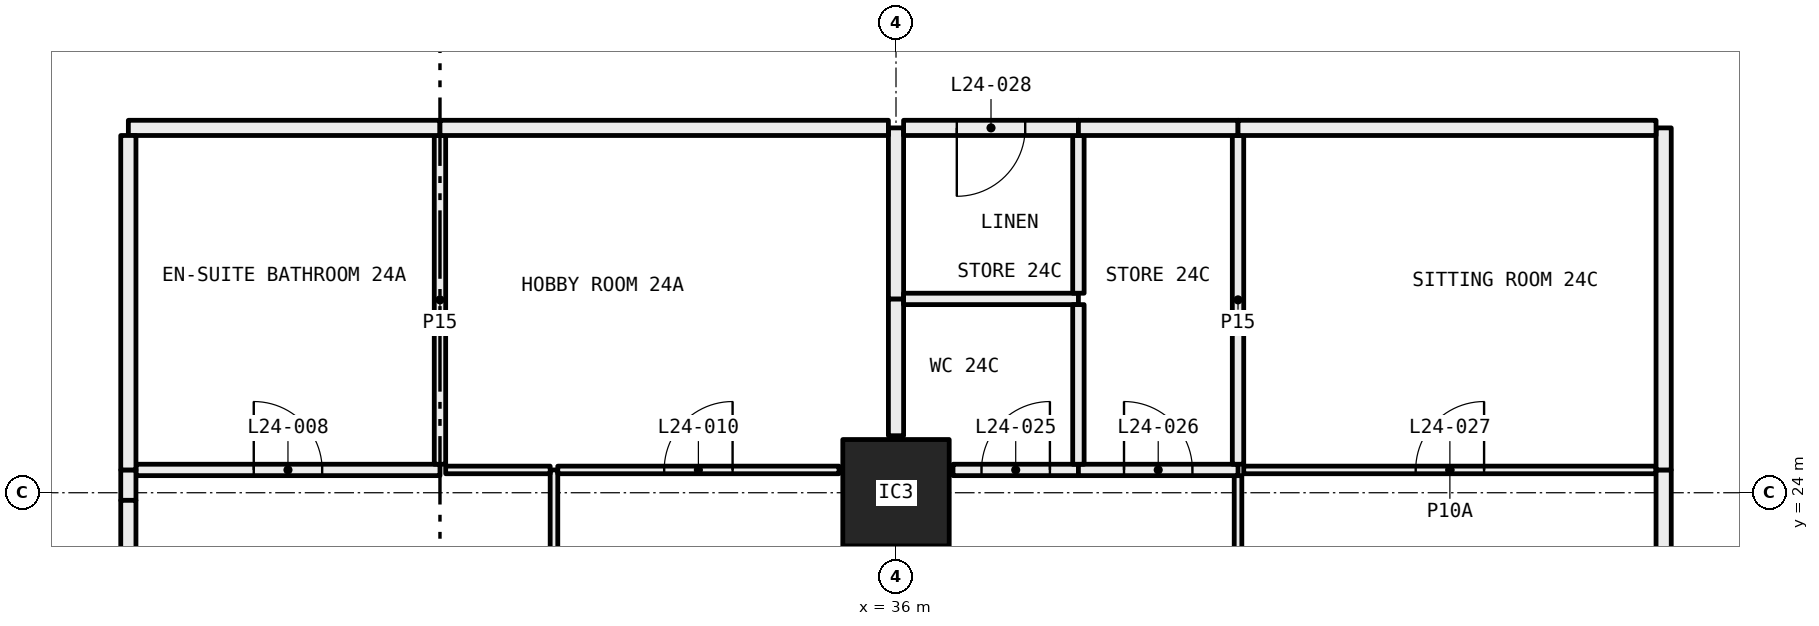
"""IFC4 building model, lengths in metres.
Left out: names, types, materials, properties, quantities, classifications, styles, units other than length and angle.
Written with IfcOpenShell. Run it as: python <this file> out.ifc"""

import sys

from ifc_helpers import new_model, si_unit, direction, frame, frame_2d, origin, origin_2d, place, context, subcontext, project, spatial, rectangle, hollow_rectangle, extrude, element, fill, save


model = new_model("IFC4")
c1 = context("Model", 3, precision=1e-05, world=origin(), true_north=direction((0.0, 1.0)))
c2 = subcontext(c1, "Body", "Model", "MODEL_VIEW")
j1 = project(units=[si_unit("LENGTHUNIT", "METRE"), si_unit("PLANEANGLEUNIT", "RADIAN")], contexts=[c1])
p1 = place(None, origin())
s1 = spatial("IfcSite", under=j1, at=p1, CompositionType="ELEMENT")
p2 = place(p1, origin())
s2 = spatial("IfcBuilding", under=s1, at=p2, CompositionType="ELEMENT")
p3 = place(p2, frame((0.0, 0.0, 96.6)))
s3 = spatial("IfcBuildingStorey", under=s2, at=p3, CompositionType="ELEMENT", Elevation=96.6)
p4 = place(p3, frame((36.0, 24.0, 0.0), z_axis=(0.0, 0.0, 1.0), x_axis=(1.0, 0.0, 0.0)))
e1 = element("IfcColumn", 1, at=p4, inside=s3, PredefinedType="COLUMN", context=c2, shape_type="SweptSolid", body=[
    extrude(hollow_rectangle(XDim=1.4, YDim=1.4, WallThickness=0.06, at=origin_2d()), origin(), (0.0, 0.0, 1.0), 3.05),
])
p5 = place(p3, frame((31.5, 18.075, 0.0), z_axis=(0.0, 0.0, 1.0), x_axis=(0.0, 1.0, 0.0)))
e2 = element("IfcWall", 2, at=p5, inside=s3, PredefinedType="PARTITIONING", context=c2, shape_type="SweptSolid", body=[
    extrude(rectangle(XDim=6.225, YDim=0.1, at=frame_2d((3.113, 0.0))), origin(), (0.0, 0.0, 1.0), 2.45),
])
p6 = place(p5, frame((2.663, 0.0, 0.0)))
e3 = element("IfcOpeningElement", 3, at=p6, cuts=e2, PredefinedType="OPENING", context=c2, shape_type="SweptSolid", body=[
    extrude(rectangle(XDim=0.9, YDim=2.1, at=frame_2d((0.45, 1.05))), frame((0.0, 0.06, 0.0), z_axis=(0.0, -1.0, 0.0), x_axis=(1.0, 0.0, 0.0)), (0.0, 0.0, 1.0), 0.12),
])
p7 = place(p3, frame((30.0, 24.3, 0.0), z_axis=(0.0, 0.0, 1.0), x_axis=(-1.0, 0.0, 0.0)))
e4 = element("IfcWall", 4, at=p7, inside=s3, PredefinedType="PARTITIONING", context=c2, shape_type="SweptSolid", body=[
    extrude(rectangle(XDim=4.0, YDim=0.15, at=frame_2d((2.0, 0.0))), origin(), (0.0, 0.0, 1.0), 3.05),
])
p8 = place(p7, frame((1.55, 0.0, 0.0)))
e5 = element("IfcOpeningElement", 5, at=p8, cuts=e4, PredefinedType="OPENING", context=c2, shape_type="SweptSolid", body=[
    extrude(rectangle(XDim=0.9, YDim=2.1, at=frame_2d((0.45, 1.05))), frame((0.0, 0.085, 0.0), z_axis=(0.0, -1.0, 0.0), x_axis=(1.0, 0.0, 0.0)), (0.0, 0.0, 1.0), 0.17),
])
p9 = place(p3, frame((31.45, 24.3, 0.0), z_axis=(0.0, 0.0, 1.0), x_axis=(-1.0, 0.0, 0.0)))
e6 = element("IfcWall", 6, at=p9, inside=s3, PredefinedType="PARTITIONING", context=c2, shape_type="SweptSolid", body=[
    extrude(rectangle(XDim=1.375, YDim=0.1, at=frame_2d((0.688, 0.0))), origin(), (0.0, 0.0, 1.0), 3.05),
])
p10 = place(p3, frame((25.9, 24.3, 0.0), z_axis=(0.0, 0.0, 1.0), x_axis=(0.0, -1.0, 0.0)))
e7 = element("IfcWall", 7, at=p10, inside=s3, PredefinedType="PARTITIONING", context=c2, shape_type="SweptSolid", body=[
    extrude(rectangle(XDim=0.4, YDim=0.2, at=frame_2d((0.2, 0.0))), origin(), (0.0, 0.0, 1.0), 2.45),
])
p11 = place(p3, frame((25.9, 23.9, 0.0), z_axis=(0.0, 0.0, 1.0), x_axis=(0.0, -1.0, 0.0)))
e8 = element("IfcWall", 8, at=p11, inside=s3, PredefinedType="PARTITIONING", context=c2, shape_type="SweptSolid", body=[
    extrude(rectangle(XDim=5.8, YDim=0.2, at=frame_2d((2.9, 0.0))), origin(), (0.0, 0.0, 1.0), 3.05),
])
p12 = place(p3, frame((35.25, 24.3, 0.0), z_axis=(0.0, 0.0, 1.0), x_axis=(-1.0, 0.0, 0.0)))
e9 = element("IfcWall", 9, at=p12, inside=s3, PredefinedType="PARTITIONING", context=c2, shape_type="SweptSolid", body=[
    extrude(rectangle(XDim=3.7, YDim=0.1, at=frame_2d((1.85, 0.0))), origin(), (0.0, 0.0, 1.0), 3.05),
])
p13 = place(p12, frame((1.4, 0.0, 0.0)))
e10 = element("IfcOpeningElement", 10, at=p13, cuts=e9, PredefinedType="OPENING", context=c2, shape_type="SweptSolid", body=[
    extrude(rectangle(XDim=0.9, YDim=2.1, at=frame_2d((0.45, 1.05))), frame((0.0, 0.06, 0.0), z_axis=(0.0, -1.0, 0.0), x_axis=(1.0, 0.0, 0.0)), (0.0, 0.0, 1.0), 0.12),
])
p14 = place(p3, frame((30.0, 24.375, 0.0), z_axis=(0.0, 0.0, 1.0), x_axis=(0.0, 1.0, 0.0)))
e11 = element("IfcWall", 11, at=p14, inside=s3, PredefinedType="PARTITIONING", context=c2, shape_type="SweptSolid", body=[
    extrude(rectangle(XDim=4.325, YDim=0.15, at=frame_2d((2.163, 0.0))), origin(), (0.0, 0.0, 1.0), 3.05),
])
p15 = place(p3, frame((30.0, 28.8, 0.0), z_axis=(0.0, 0.0, 1.0), x_axis=(-1.0, 0.0, 0.0)))
e12 = element("IfcWall", 12, at=p15, inside=s3, PredefinedType="PARTITIONING", context=c2, shape_type="SweptSolid", body=[
    extrude(rectangle(XDim=4.1, YDim=0.2, at=frame_2d((2.05, 0.0))), origin(), (0.0, 0.0, 1.0), 3.05),
])
p16 = place(p3, frame((25.9, 28.7, 0.0), z_axis=(0.0, 0.0, 1.0), x_axis=(0.0, -1.0, 0.0)))
e13 = element("IfcWall", 13, at=p16, inside=s3, PredefinedType="PARTITIONING", context=c2, shape_type="SweptSolid", body=[
    extrude(rectangle(XDim=4.4, YDim=0.2, at=frame_2d((2.2, 0.0))), origin(), (0.0, 0.0, 1.0), 3.05),
])
p17 = place(p3, frame((36.0, 24.75, 0.0), z_axis=(0.0, 0.0, 1.0), x_axis=(0.0, 1.0, 0.0)))
e14 = element("IfcWall", 14, at=p17, inside=s3, PredefinedType="PARTITIONING", context=c2, shape_type="SweptSolid", body=[
    extrude(rectangle(XDim=1.8, YDim=0.2, at=frame_2d((0.9, 0.0))), origin(), (0.0, 0.0, 1.0), 2.45),
])
p18 = place(p3, frame((36.0, 26.55, 0.0), z_axis=(0.0, 0.0, 1.0), x_axis=(0.0, 1.0, 0.0)))
e15 = element("IfcWall", 15, at=p18, inside=s3, PredefinedType="PARTITIONING", context=c2, shape_type="SweptSolid", body=[
    extrude(rectangle(XDim=2.25, YDim=0.2, at=frame_2d((1.125, 0.0))), origin(), (0.0, 0.0, 1.0), 2.45),
])
p19 = place(p3, frame((35.9, 28.8, 0.0), z_axis=(0.0, 0.0, 1.0), x_axis=(-1.0, 0.0, 0.0)))
e16 = element("IfcWall", 16, at=p19, inside=s3, PredefinedType="PARTITIONING", context=c2, shape_type="SweptSolid", body=[
    extrude(rectangle(XDim=5.9, YDim=0.2, at=frame_2d((2.95, 0.0))), origin(), (0.0, 0.0, 1.0), 3.05),
])
p20 = place(p3, frame((40.5, 18.075, 0.0), z_axis=(0.0, 0.0, 1.0), x_axis=(0.0, 1.0, 0.0)))
e17 = element("IfcWall", 17, at=p20, inside=s3, PredefinedType="PARTITIONING", context=c2, shape_type="SweptSolid", body=[
    extrude(rectangle(XDim=6.15, YDim=0.1, at=frame_2d((3.075, 0.0))), origin(), (0.0, 0.0, 1.0), 2.45),
])
p21 = place(p20, frame((2.625, 0.0, 0.0)))
e18 = element("IfcOpeningElement", 18, at=p21, cuts=e17, PredefinedType="OPENING", context=c2, shape_type="SweptSolid", body=[
    extrude(rectangle(XDim=0.9, YDim=2.1, at=frame_2d((0.45, 1.05))), frame((0.0, 0.06, 0.0), z_axis=(0.0, -1.0, 0.0), x_axis=(1.0, 0.0, 0.0)), (0.0, 0.0, 1.0), 0.12),
])
p22 = place(p3, frame((38.4, 24.3, 0.0), z_axis=(0.0, 0.0, 1.0), x_axis=(-1.0, 0.0, 0.0)))
e19 = element("IfcWall", 19, at=p22, inside=s3, PredefinedType="PARTITIONING", context=c2, shape_type="SweptSolid", body=[
    extrude(rectangle(XDim=1.65, YDim=0.15, at=frame_2d((0.825, 0.0))), origin(), (0.0, 0.0, 1.0), 3.05),
])
p23 = place(p22, frame((0.375, 0.0, 0.0)))
e20 = element("IfcOpeningElement", 20, at=p23, cuts=e19, PredefinedType="OPENING", context=c2, shape_type="SweptSolid", body=[
    extrude(rectangle(XDim=0.9, YDim=2.1, at=frame_2d((0.45, 1.05))), frame((0.0, 0.085, 0.0), z_axis=(0.0, -1.0, 0.0), x_axis=(1.0, 0.0, 0.0)), (0.0, 0.0, 1.0), 0.17),
])
p24 = place(p3, frame((40.5, 24.3, 0.0), z_axis=(0.0, 0.0, 1.0), x_axis=(-1.0, 0.0, 0.0)))
e21 = element("IfcWall", 21, at=p24, inside=s3, PredefinedType="PARTITIONING", context=c2, shape_type="SweptSolid", body=[
    extrude(rectangle(XDim=2.1, YDim=0.15, at=frame_2d((1.05, 0.0))), origin(), (0.0, 0.0, 1.0), 3.05),
])
p25 = place(p24, frame((0.6, 0.0, 0.0)))
e22 = element("IfcOpeningElement", 22, at=p25, cuts=e21, PredefinedType="OPENING", context=c2, shape_type="SweptSolid", body=[
    extrude(rectangle(XDim=0.9, YDim=2.1, at=frame_2d((0.45, 1.05))), frame((0.0, 0.085, 0.0), z_axis=(0.0, -1.0, 0.0), x_axis=(1.0, 0.0, 0.0)), (0.0, 0.0, 1.0), 0.17),
])
p26 = place(p3, frame((46.0, 24.3, 0.0), z_axis=(0.0, 0.0, 1.0), x_axis=(-1.0, 0.0, 0.0)))
e23 = element("IfcWall", 23, at=p26, inside=s3, PredefinedType="PARTITIONING", context=c2, shape_type="SweptSolid", body=[
    extrude(rectangle(XDim=5.425, YDim=0.1, at=frame_2d((2.712, 0.0))), origin(), (0.0, 0.0, 1.0), 3.05),
])
p27 = place(p26, frame((2.262, 0.0, 0.0)))
e24 = element("IfcOpeningElement", 24, at=p27, cuts=e23, PredefinedType="OPENING", context=c2, shape_type="SweptSolid", body=[
    extrude(rectangle(XDim=0.9, YDim=2.1, at=frame_2d((0.45, 1.05))), frame((0.0, 0.06, 0.0), z_axis=(0.0, -1.0, 0.0), x_axis=(1.0, 0.0, 0.0)), (0.0, 0.0, 1.0), 0.12),
])
p28 = place(p3, frame((46.1, 18.1, 0.0), z_axis=(0.0, 0.0, 1.0), x_axis=(0.0, 1.0, 0.0)))
e25 = element("IfcWall", 25, at=p28, inside=s3, PredefinedType="PARTITIONING", context=c2, shape_type="SweptSolid", body=[
    extrude(rectangle(XDim=6.2, YDim=0.2, at=frame_2d((3.1, 0.0))), origin(), (0.0, 0.0, 1.0), 2.45),
])
p29 = place(p3, frame((38.4, 26.55, 0.0), z_axis=(0.0, 0.0, 1.0), x_axis=(-1.0, 0.0, 0.0)))
e26 = element("IfcWall", 26, at=p29, inside=s3, PredefinedType="PARTITIONING", context=c2, shape_type="SweptSolid", body=[
    extrude(rectangle(XDim=2.3, YDim=0.15, at=frame_2d((1.15, 0.0))), origin(), (0.0, 0.0, 1.0), 3.05),
])
p30 = place(p3, frame((38.4, 24.375, 0.0), z_axis=(0.0, 0.0, 1.0), x_axis=(0.0, 1.0, 0.0)))
e27 = element("IfcWall", 27, at=p30, inside=s3, PredefinedType="PARTITIONING", context=c2, shape_type="SweptSolid", body=[
    extrude(rectangle(XDim=2.1, YDim=0.15, at=frame_2d((1.05, 0.0))), origin(), (0.0, 0.0, 1.0), 3.05),
])
p31 = place(p3, frame((38.4, 26.625, 0.0), z_axis=(0.0, 0.0, 1.0), x_axis=(0.0, 1.0, 0.0)))
e28 = element("IfcWall", 28, at=p31, inside=s3, PredefinedType="PARTITIONING", context=c2, shape_type="SweptSolid", body=[
    extrude(rectangle(XDim=2.075, YDim=0.15, at=frame_2d((1.038, 0.0))), origin(), (0.0, 0.0, 1.0), 3.05),
])
p32 = place(p3, frame((38.4, 28.8, 0.0), z_axis=(0.0, 0.0, 1.0), x_axis=(-1.0, 0.0, 0.0)))
e29 = element("IfcWall", 29, at=p32, inside=s3, PredefinedType="PARTITIONING", context=c2, shape_type="SweptSolid", body=[
    extrude(rectangle(XDim=2.3, YDim=0.2, at=frame_2d((1.15, 0.0))), origin(), (0.0, 0.0, 1.0), 3.05),
])
p33 = place(p32, frame((0.7, 0.0, 0.0)))
e30 = element("IfcOpeningElement", 30, at=p33, cuts=e29, PredefinedType="OPENING", context=c2, shape_type="SweptSolid", body=[
    extrude(rectangle(XDim=0.9, YDim=2.1, at=frame_2d((0.45, 1.05))), frame((0.0, 0.11, 0.0), z_axis=(0.0, -1.0, 0.0), x_axis=(1.0, 0.0, 0.0)), (0.0, 0.0, 1.0), 0.22),
])
p34 = place(p3, frame((40.5, 24.375, 0.0), z_axis=(0.0, 0.0, 1.0), x_axis=(0.0, 1.0, 0.0)))
e31 = element("IfcWall", 31, at=p34, inside=s3, PredefinedType="PARTITIONING", context=c2, shape_type="SweptSolid", body=[
    extrude(rectangle(XDim=4.325, YDim=0.15, at=frame_2d((2.163, 0.0))), origin(), (0.0, 0.0, 1.0), 3.05),
])
p35 = place(p3, frame((40.5, 28.8, 0.0), z_axis=(0.0, 0.0, 1.0), x_axis=(-1.0, 0.0, 0.0)))
e32 = element("IfcWall", 32, at=p35, inside=s3, PredefinedType="PARTITIONING", context=c2, shape_type="SweptSolid", body=[
    extrude(rectangle(XDim=2.1, YDim=0.2, at=frame_2d((1.05, 0.0))), origin(), (0.0, 0.0, 1.0), 3.05),
])
p36 = place(p3, frame((46.1, 24.3, 0.0), z_axis=(0.0, 0.0, 1.0), x_axis=(0.0, 1.0, 0.0)))
e33 = element("IfcWall", 33, at=p36, inside=s3, PredefinedType="PARTITIONING", context=c2, shape_type="SweptSolid", body=[
    extrude(rectangle(XDim=4.5, YDim=0.2, at=frame_2d((2.25, 0.0))), origin(), (0.0, 0.0, 1.0), 3.05),
])
p37 = place(p3, frame((46.0, 28.8, 0.0), z_axis=(0.0, 0.0, 1.0), x_axis=(-1.0, 0.0, 0.0)))
e34 = element("IfcWall", 34, at=p37, inside=s3, PredefinedType="PARTITIONING", context=c2, shape_type="SweptSolid", body=[
    extrude(rectangle(XDim=5.5, YDim=0.2, at=frame_2d((2.75, 0.0))), origin(), (0.0, 0.0, 1.0), 3.05),
])
p38 = place(p8, frame((0.9, 0.0, 0.0), x_axis=(-1.0, 0.0, 0.0)))
e35 = element("IfcDoor", 35, at=p38, inside=s3, OperationType="SINGLE_SWING_RIGHT", PredefinedType="DOOR", context=c2, shape_type="SweptSolid", body=[
    extrude(rectangle(XDim=0.9, YDim=2.1, at=frame_2d((0.45, 1.05))), frame((0.0, 0.025, 0.0), z_axis=(0.0, -1.0, 0.0), x_axis=(1.0, 0.0, 0.0)), (0.0, 0.0, 1.0), 0.05),
])
fill(e5, e35)
p39 = place(p13, frame((0.9, 0.0, 0.0), x_axis=(-1.0, 0.0, 0.0)))
e36 = element("IfcDoor", 36, at=p39, inside=s3, OperationType="SINGLE_SWING_LEFT", PredefinedType="DOOR", context=c2, shape_type="SweptSolid", body=[
    extrude(rectangle(XDim=0.9, YDim=2.1, at=frame_2d((0.45, 1.05))), frame((0.0, 0.025, 0.0), z_axis=(0.0, -1.0, 0.0), x_axis=(1.0, 0.0, 0.0)), (0.0, 0.0, 1.0), 0.05),
])
fill(e10, e36)
p40 = place(p23, frame((0.9, 0.0, 0.0), x_axis=(-1.0, 0.0, 0.0)))
e37 = element("IfcDoor", 37, at=p40, inside=s3, OperationType="SINGLE_SWING_LEFT", PredefinedType="DOOR", context=c2, shape_type="SweptSolid", body=[
    extrude(rectangle(XDim=0.9, YDim=2.1, at=frame_2d((0.45, 1.05))), frame((0.0, 0.025, 0.0), z_axis=(0.0, -1.0, 0.0), x_axis=(1.0, 0.0, 0.0)), (0.0, 0.0, 1.0), 0.05),
])
fill(e20, e37)
p41 = place(p25, frame((0.9, 0.0, 0.0), x_axis=(-1.0, 0.0, 0.0)))
e38 = element("IfcDoor", 38, at=p41, inside=s3, OperationType="SINGLE_SWING_RIGHT", PredefinedType="DOOR", context=c2, shape_type="SweptSolid", body=[
    extrude(rectangle(XDim=0.9, YDim=2.1, at=frame_2d((0.45, 1.05))), frame((0.0, 0.025, 0.0), z_axis=(0.0, -1.0, 0.0), x_axis=(1.0, 0.0, 0.0)), (0.0, 0.0, 1.0), 0.05),
])
fill(e22, e38)
p42 = place(p27, frame((0.9, 0.0, 0.0), x_axis=(-1.0, 0.0, 0.0)))
e39 = element("IfcDoor", 39, at=p42, inside=s3, OperationType="SINGLE_SWING_LEFT", PredefinedType="DOOR", context=c2, shape_type="SweptSolid", body=[
    extrude(rectangle(XDim=0.9, YDim=2.1, at=frame_2d((0.45, 1.05))), frame((0.0, 0.025, 0.0), z_axis=(0.0, -1.0, 0.0), x_axis=(1.0, 0.0, 0.0)), (0.0, 0.0, 1.0), 0.05),
])
fill(e24, e39)
p43 = place(p33, origin())
e40 = element("IfcDoor", 40, at=p43, inside=s3, OperationType="SINGLE_SWING_LEFT", PredefinedType="DOOR", context=c2, shape_type="SweptSolid", body=[
    extrude(rectangle(XDim=0.9, YDim=2.1, at=frame_2d((0.45, 1.05))), frame((0.0, 0.025, 0.0), z_axis=(0.0, -1.0, 0.0), x_axis=(1.0, 0.0, 0.0)), (0.0, 0.0, 1.0), 0.05),
])
fill(e30, e40)
save(model, sys.argv[1])
